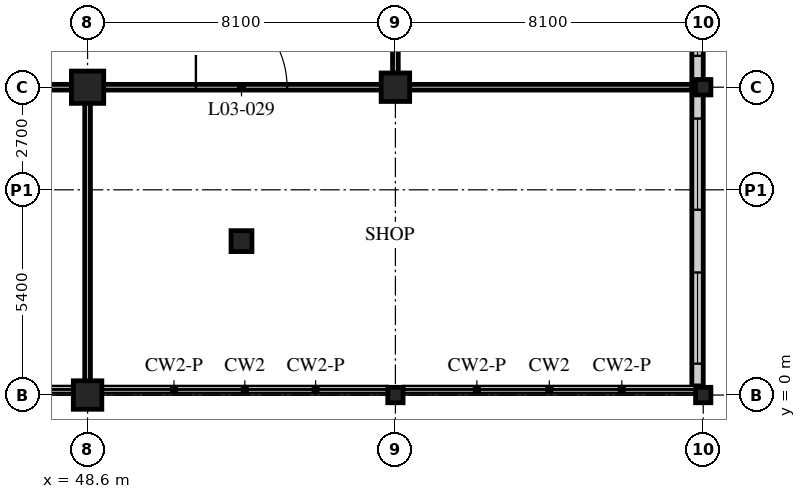
"""IFC4 building model, lengths in metres.
Left out: names, types, materials, properties, quantities, classifications, styles, units other than length and angle.
Written with IfcOpenShell. Run it as: python <this file> out.ifc"""

import sys

from ifc_helpers import new_model, si_unit, direction, frame, frame_2d, origin, origin_2d, place, context, subcontext, project, spatial, rectangle, hollow_rectangle, i_section, extrude, element, fill, save


model = new_model("IFC4")
c1 = context("Model", 3, precision=1e-05, world=origin(), true_north=direction((0.0, 1.0)))
c2 = subcontext(c1, "Body", "Model", "MODEL_VIEW")
j1 = project(units=[si_unit("LENGTHUNIT", "METRE"), si_unit("PLANEANGLEUNIT", "RADIAN")], contexts=[c1])
p1 = place(None, origin())
s1 = spatial("IfcSite", under=j1, at=p1, CompositionType="ELEMENT")
p2 = place(p1, origin())
s2 = spatial("IfcBuilding", under=s1, at=p2, CompositionType="ELEMENT")
p3 = place(p2, frame((0.0, 0.0, 16.8)))
s3 = spatial("IfcBuildingStorey", under=s2, at=p3, CompositionType="ELEMENT", Elevation=16.8)
p4 = place(p3, frame((48.6, 0.0, 0.0), z_axis=(0.0, 0.0, 1.0), x_axis=(1.0, 0.0, 0.0)))
e1 = element("IfcColumn", 1, at=p4, inside=s3, PredefinedType="COLUMN", context=c2, shape_type="SweptSolid", body=[
    extrude(hollow_rectangle(XDim=0.75, YDim=0.75, WallThickness=0.07, at=origin_2d()), origin(), (0.0, 0.0, 1.0), 5.4),
])
p5 = place(p3, frame((48.6, 8.1, 0.0), z_axis=(0.0, 0.0, 1.0), x_axis=(1.0, 0.0, 0.0)))
e2 = element("IfcColumn", 2, at=p5, inside=s3, PredefinedType="COLUMN", context=c2, shape_type="SweptSolid", body=[
    extrude(hollow_rectangle(XDim=0.85, YDim=0.85, WallThickness=0.085, at=origin_2d()), origin(), (0.0, 0.0, 1.0), 5.4),
])
p6 = place(p3, frame((52.65, 4.05, 0.0), z_axis=(0.0, 0.0, 1.0), x_axis=(1.0, 0.0, 0.0)))
e3 = element("IfcColumn", 3, at=p6, inside=s3, PredefinedType="COLUMN", context=c2, shape_type="SweptSolid", body=[
    extrude(hollow_rectangle(XDim=0.55, YDim=0.55, WallThickness=0.05, at=origin_2d()), origin(), (0.0, 0.0, 1.0), 5.4),
])
p7 = place(p3, frame((56.7, 0.0, 0.0), z_axis=(0.0, 0.0, 1.0), x_axis=(1.0, 0.0, 0.0)))
e4 = element("IfcColumn", 4, at=p7, inside=s3, PredefinedType="COLUMN", context=c2, shape_type="SweptSolid", body=[
    extrude(i_section(OverallWidth=0.403, OverallDepth=0.406, WebThickness=0.027, FlangeThickness=0.043, FilletRadius=0.015, at=origin_2d()), origin(), (0.0, 0.0, 1.0), 5.4),
])
p8 = place(p3, frame((56.7, 8.1, 0.0), z_axis=(0.0, 0.0, 1.0), x_axis=(1.0, 0.0, 0.0)))
e5 = element("IfcColumn", 5, at=p8, inside=s3, PredefinedType="COLUMN", context=c2, shape_type="SweptSolid", body=[
    extrude(hollow_rectangle(XDim=0.75, YDim=0.75, WallThickness=0.07, at=origin_2d()), origin(), (0.0, 0.0, 1.0), 5.4),
])
for number, where, z_axis, x_axis in (
    (6, (64.8, 0.0, 0.0), (0.0, 0.0, 1.0), (1.0, 0.0, 0.0)),
    (7, (64.8, 8.1, 0.0), (0.0, 0.0, 1.0), (1.0, 0.0, 0.0)),
):
    element("IfcColumn", number, at=place(p3, frame(where, z_axis=z_axis, x_axis=x_axis)), inside=s3, PredefinedType="COLUMN", context=c2, shape_type="SweptSolid", body=[
        extrude(i_section(OverallWidth=0.403, OverallDepth=0.406, WebThickness=0.027, FlangeThickness=0.043, FilletRadius=0.015, at=origin_2d()), origin(), (0.0, 0.0, 1.0), 5.4),
    ])
p9 = place(p3, frame((64.65, 0.24, 0.0), z_axis=(0.0, 0.0, 1.0), x_axis=(0.0, 1.0, 0.0)))
e8 = element("IfcWall", 8, at=p9, inside=s3, PredefinedType="SOLIDWALL", context=c2, shape_type="SweptSolid", body=[
    extrude(rectangle(XDim=48.36, YDim=0.3, at=frame_2d((24.18, 0.0))), origin(), (0.0, 0.0, 1.0), 5.15),
])
p10 = place(p9, frame((0.585, 0.0, 1.0)))
e9 = element("IfcOpeningElement", 9, at=p10, cuts=e8, PredefinedType="OPENING", context=c2, shape_type="SweptSolid", body=[
    extrude(rectangle(XDim=2.4, YDim=2.75, at=frame_2d((1.2, 1.375))), frame((0.0, 0.16, 0.0), z_axis=(0.0, -1.0, 0.0), x_axis=(1.0, 0.0, 0.0)), (0.0, 0.0, 1.0), 0.32),
])
p11 = place(p9, frame((4.635, 0.0, 1.0)))
e10 = element("IfcOpeningElement", 10, at=p11, cuts=e8, PredefinedType="OPENING", context=c2, shape_type="SweptSolid", body=[
    extrude(rectangle(XDim=2.4, YDim=2.75, at=frame_2d((1.2, 1.375))), frame((0.0, 0.16, 0.0), z_axis=(0.0, -1.0, 0.0), x_axis=(1.0, 0.0, 0.0)), (0.0, 0.0, 1.0), 0.32),
])
p12 = place(p9, frame((8.685, 0.0, 1.0)))
e11 = element("IfcOpeningElement", 11, at=p12, cuts=e8, PredefinedType="OPENING", context=c2, shape_type="SweptSolid", body=[
    extrude(rectangle(XDim=2.4, YDim=2.75, at=frame_2d((1.2, 1.375))), frame((0.0, 0.16, 0.0), z_axis=(0.0, -1.0, 0.0), x_axis=(1.0, 0.0, 0.0)), (0.0, 0.0, 1.0), 0.32),
])
p13 = place(p9, frame((12.735, 0.0, 1.0)))
e12 = element("IfcOpeningElement", 12, at=p13, cuts=e8, PredefinedType="OPENING", context=c2, shape_type="SweptSolid", body=[
    extrude(rectangle(XDim=2.4, YDim=2.75, at=frame_2d((1.2, 1.375))), frame((0.0, 0.16, 0.0), z_axis=(0.0, -1.0, 0.0), x_axis=(1.0, 0.0, 0.0)), (0.0, 0.0, 1.0), 0.32),
])
p14 = place(p9, frame((16.785, 0.0, 1.0)))
e13 = element("IfcOpeningElement", 13, at=p14, cuts=e8, PredefinedType="OPENING", context=c2, shape_type="SweptSolid", body=[
    extrude(rectangle(XDim=2.4, YDim=2.75, at=frame_2d((1.2, 1.375))), frame((0.0, 0.16, 0.0), z_axis=(0.0, -1.0, 0.0), x_axis=(1.0, 0.0, 0.0)), (0.0, 0.0, 1.0), 0.32),
])
p15 = place(p9, frame((20.835, 0.0, 1.0)))
e14 = element("IfcOpeningElement", 14, at=p15, cuts=e8, PredefinedType="OPENING", context=c2, shape_type="SweptSolid", body=[
    extrude(rectangle(XDim=2.4, YDim=2.75, at=frame_2d((1.2, 1.375))), frame((0.0, 0.16, 0.0), z_axis=(0.0, -1.0, 0.0), x_axis=(1.0, 0.0, 0.0)), (0.0, 0.0, 1.0), 0.32),
])
p16 = place(p9, frame((24.885, 0.0, 1.0)))
e15 = element("IfcOpeningElement", 15, at=p16, cuts=e8, PredefinedType="OPENING", context=c2, shape_type="SweptSolid", body=[
    extrude(rectangle(XDim=2.4, YDim=2.75, at=frame_2d((1.2, 1.375))), frame((0.0, 0.16, 0.0), z_axis=(0.0, -1.0, 0.0), x_axis=(1.0, 0.0, 0.0)), (0.0, 0.0, 1.0), 0.32),
])
p17 = place(p9, frame((28.935, 0.0, 1.0)))
e16 = element("IfcOpeningElement", 16, at=p17, cuts=e8, PredefinedType="OPENING", context=c2, shape_type="SweptSolid", body=[
    extrude(rectangle(XDim=2.4, YDim=2.75, at=frame_2d((1.2, 1.375))), frame((0.0, 0.16, 0.0), z_axis=(0.0, -1.0, 0.0), x_axis=(1.0, 0.0, 0.0)), (0.0, 0.0, 1.0), 0.32),
])
p18 = place(p9, frame((32.985, 0.0, 1.0)))
e17 = element("IfcOpeningElement", 17, at=p18, cuts=e8, PredefinedType="OPENING", context=c2, shape_type="SweptSolid", body=[
    extrude(rectangle(XDim=2.4, YDim=2.75, at=frame_2d((1.2, 1.375))), frame((0.0, 0.16, 0.0), z_axis=(0.0, -1.0, 0.0), x_axis=(1.0, 0.0, 0.0)), (0.0, 0.0, 1.0), 0.32),
])
p19 = place(p9, frame((37.035, 0.0, 1.0)))
e18 = element("IfcOpeningElement", 18, at=p19, cuts=e8, PredefinedType="OPENING", context=c2, shape_type="SweptSolid", body=[
    extrude(rectangle(XDim=2.4, YDim=2.75, at=frame_2d((1.2, 1.375))), frame((0.0, 0.16, 0.0), z_axis=(0.0, -1.0, 0.0), x_axis=(1.0, 0.0, 0.0)), (0.0, 0.0, 1.0), 0.32),
])
p20 = place(p9, frame((41.085, 0.0, 1.0)))
e19 = element("IfcOpeningElement", 19, at=p20, cuts=e8, PredefinedType="OPENING", context=c2, shape_type="SweptSolid", body=[
    extrude(rectangle(XDim=2.4, YDim=2.75, at=frame_2d((1.2, 1.375))), frame((0.0, 0.16, 0.0), z_axis=(0.0, -1.0, 0.0), x_axis=(1.0, 0.0, 0.0)), (0.0, 0.0, 1.0), 0.32),
])
p21 = place(p9, frame((45.135, 0.0, 1.0)))
e20 = element("IfcOpeningElement", 20, at=p21, cuts=e8, PredefinedType="OPENING", context=c2, shape_type="SweptSolid", body=[
    extrude(rectangle(XDim=2.4, YDim=2.75, at=frame_2d((1.2, 1.375))), frame((0.0, 0.16, 0.0), z_axis=(0.0, -1.0, 0.0), x_axis=(1.0, 0.0, 0.0)), (0.0, 0.0, 1.0), 0.32),
])
p22 = place(p3, frame((8.1, 8.1, 0.0), z_axis=(0.0, 0.0, 1.0), x_axis=(1.0, 0.0, 0.0)))
e21 = element("IfcWall", 21, at=p22, inside=s3, PredefinedType="PARTITIONING", context=c2, shape_type="SweptSolid", body=[
    extrude(rectangle(XDim=48.6, YDim=0.15, at=frame_2d((24.3, 0.0))), origin(), (0.0, 0.0, 1.0), 4.538),
])
p23 = place(p22, frame((11.25, 0.0, 0.0)))
e22 = element("IfcOpeningElement", 22, at=p23, cuts=e21, PredefinedType="OPENING", context=c2, shape_type="SweptSolid", body=[
    extrude(rectangle(XDim=1.8, YDim=2.4, at=frame_2d((0.9, 1.2))), frame((0.0, 0.085, 0.0), z_axis=(0.0, -1.0, 0.0), x_axis=(1.0, 0.0, 0.0)), (0.0, 0.0, 1.0), 0.17),
])
p24 = place(p22, frame((19.05, 0.0, 0.0)))
e23 = element("IfcOpeningElement", 23, at=p24, cuts=e21, PredefinedType="OPENING", context=c2, shape_type="SweptSolid", body=[
    extrude(rectangle(XDim=2.4, YDim=2.7, at=frame_2d((1.2, 1.35))), frame((0.0, 0.085, 0.0), z_axis=(0.0, -1.0, 0.0), x_axis=(1.0, 0.0, 0.0)), (0.0, 0.0, 1.0), 0.17),
])
p25 = place(p22, frame((27.15, 0.0, 0.0)))
e24 = element("IfcOpeningElement", 24, at=p25, cuts=e21, PredefinedType="OPENING", context=c2, shape_type="SweptSolid", body=[
    extrude(rectangle(XDim=2.4, YDim=2.7, at=frame_2d((1.2, 1.35))), frame((0.0, 0.085, 0.0), z_axis=(0.0, -1.0, 0.0), x_axis=(1.0, 0.0, 0.0)), (0.0, 0.0, 1.0), 0.17),
])
p26 = place(p22, frame((35.25, 0.0, 0.0)))
e25 = element("IfcOpeningElement", 25, at=p26, cuts=e21, PredefinedType="OPENING", context=c2, shape_type="SweptSolid", body=[
    extrude(rectangle(XDim=2.4, YDim=2.7, at=frame_2d((1.2, 1.35))), frame((0.0, 0.085, 0.0), z_axis=(0.0, -1.0, 0.0), x_axis=(1.0, 0.0, 0.0)), (0.0, 0.0, 1.0), 0.17),
])
p27 = place(p22, frame((2.85, 0.0, 0.0)))
e26 = element("IfcOpeningElement", 26, at=p27, cuts=e21, PredefinedType="OPENING", context=c2, shape_type="SweptSolid", body=[
    extrude(rectangle(XDim=2.4, YDim=2.7, at=frame_2d((1.2, 1.35))), frame((0.0, 0.085, 0.0), z_axis=(0.0, -1.0, 0.0), x_axis=(1.0, 0.0, 0.0)), (0.0, 0.0, 1.0), 0.17),
])
p28 = place(p22, frame((43.35, 0.0, 0.0)))
e27 = element("IfcOpeningElement", 27, at=p28, cuts=e21, PredefinedType="OPENING", context=c2, shape_type="SweptSolid", body=[
    extrude(rectangle(XDim=2.4, YDim=2.7, at=frame_2d((1.2, 1.35))), frame((0.0, 0.085, 0.0), z_axis=(0.0, -1.0, 0.0), x_axis=(1.0, 0.0, 0.0)), (0.0, 0.0, 1.0), 0.17),
])
p29 = place(p3, frame((56.7, 8.1, 0.0), z_axis=(0.0, 0.0, 1.0), x_axis=(0.0, 1.0, 0.0)))
e28 = element("IfcWall", 28, at=p29, inside=s3, PredefinedType="PARTITIONING", context=c2, shape_type="SweptSolid", body=[
    extrude(rectangle(XDim=34.35, YDim=0.15, at=frame_2d((17.175, 0.0))), origin(), (0.0, 0.0, 1.0), 4.538),
])
p30 = place(p29, frame((2.85, 0.0, 0.0)))
e29 = element("IfcOpeningElement", 29, at=p30, cuts=e28, PredefinedType="OPENING", context=c2, shape_type="SweptSolid", body=[
    extrude(rectangle(XDim=2.4, YDim=2.7, at=frame_2d((1.2, 1.35))), frame((0.0, 0.085, 0.0), z_axis=(0.0, -1.0, 0.0), x_axis=(1.0, 0.0, 0.0)), (0.0, 0.0, 1.0), 0.17),
])
p31 = place(p29, frame((10.95, 0.0, 0.0)))
e30 = element("IfcOpeningElement", 30, at=p31, cuts=e28, PredefinedType="OPENING", context=c2, shape_type="SweptSolid", body=[
    extrude(rectangle(XDim=2.4, YDim=2.7, at=frame_2d((1.2, 1.35))), frame((0.0, 0.085, 0.0), z_axis=(0.0, -1.0, 0.0), x_axis=(1.0, 0.0, 0.0)), (0.0, 0.0, 1.0), 0.17),
])
p32 = place(p29, frame((19.05, 0.0, 0.0)))
e31 = element("IfcOpeningElement", 31, at=p32, cuts=e28, PredefinedType="OPENING", context=c2, shape_type="SweptSolid", body=[
    extrude(rectangle(XDim=2.4, YDim=2.7, at=frame_2d((1.2, 1.35))), frame((0.0, 0.085, 0.0), z_axis=(0.0, -1.0, 0.0), x_axis=(1.0, 0.0, 0.0)), (0.0, 0.0, 1.0), 0.17),
])
p33 = place(p29, frame((27.15, 0.0, 0.0)))
e32 = element("IfcOpeningElement", 32, at=p33, cuts=e28, PredefinedType="OPENING", context=c2, shape_type="SweptSolid", body=[
    extrude(rectangle(XDim=2.4, YDim=2.7, at=frame_2d((1.2, 1.35))), frame((0.0, 0.085, 0.0), z_axis=(0.0, -1.0, 0.0), x_axis=(1.0, 0.0, 0.0)), (0.0, 0.0, 1.0), 0.17),
])
for number, where, z_axis, x_axis in (
    (33, (56.7, 8.1, 0.0), (0.0, 0.0, 1.0), (1.0, 0.0, 0.0)),
    (34, (48.6, 8.1, 0.0), (0.0, 0.0, 1.0), (0.0, -1.0, 0.0)),
):
    element("IfcWall", number, at=place(p3, frame(where, z_axis=z_axis, x_axis=x_axis)), inside=s3, PredefinedType="PARTITIONING", context=c2, shape_type="SweptSolid", body=[
        extrude(rectangle(XDim=7.8, YDim=0.15, at=frame_2d((3.9, 0.0))), origin(), (0.0, 0.0, 1.0), 4.538),
    ])
p34 = place(p10, origin())
e35 = element("IfcWindow", 35, at=p34, inside=s3, PartitioningType="SINGLE_PANEL", PredefinedType="WINDOW", context=c2, shape_type="SweptSolid", body=[
    extrude(rectangle(XDim=2.4, YDim=2.75, at=frame_2d((1.2, 1.375))), frame((0.0, 0.03, 0.0), z_axis=(0.0, -1.0, 0.0), x_axis=(1.0, 0.0, 0.0)), (0.0, 0.0, 1.0), 0.06),
])
fill(e9, e35)
p35 = place(p11, origin())
e36 = element("IfcWindow", 36, at=p35, inside=s3, PartitioningType="SINGLE_PANEL", PredefinedType="WINDOW", context=c2, shape_type="SweptSolid", body=[
    extrude(rectangle(XDim=2.4, YDim=2.75, at=frame_2d((1.2, 1.375))), frame((0.0, 0.03, 0.0), z_axis=(0.0, -1.0, 0.0), x_axis=(1.0, 0.0, 0.0)), (0.0, 0.0, 1.0), 0.06),
])
fill(e10, e36)
p36 = place(p12, origin())
e37 = element("IfcWindow", 37, at=p36, inside=s3, PartitioningType="SINGLE_PANEL", PredefinedType="WINDOW", context=c2, shape_type="SweptSolid", body=[
    extrude(rectangle(XDim=2.4, YDim=2.75, at=frame_2d((1.2, 1.375))), frame((0.0, 0.03, 0.0), z_axis=(0.0, -1.0, 0.0), x_axis=(1.0, 0.0, 0.0)), (0.0, 0.0, 1.0), 0.06),
])
fill(e11, e37)
p37 = place(p28, origin())
e38 = element("IfcDoor", 38, at=p37, inside=s3, OperationType="DOUBLE_DOOR_SINGLE_SWING", PredefinedType="DOOR", context=c2, shape_type="SweptSolid", body=[
    extrude(rectangle(XDim=2.4, YDim=2.7, at=frame_2d((1.2, 1.35))), frame((0.0, 0.025, 0.0), z_axis=(0.0, -1.0, 0.0), x_axis=(1.0, 0.0, 0.0)), (0.0, 0.0, 1.0), 0.05),
])
fill(e27, e38)
save(model, sys.argv[1])
